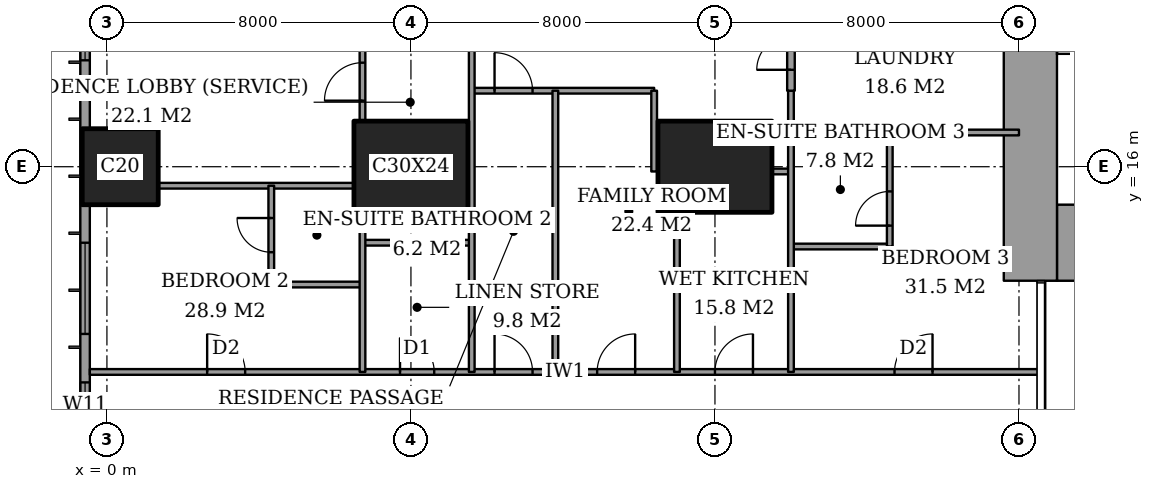
"""IFC4 building model, lengths in metres.
Left out: names, types, materials, properties, quantities, classifications, styles, units other than length and angle.
Written with IfcOpenShell. Run it as: python <this file> out.ifc"""

import sys

from ifc_helpers import new_model, si_unit, direction, frame, frame_2d, origin, origin_2d, place, context, subcontext, project, spatial, rectangle, extrude, element, fill, save


model = new_model("IFC4")
c1 = context("Model", 3, precision=1e-05, world=origin(), true_north=direction((0.0, 1.0)))
c2 = subcontext(c1, "Body", "Model", "MODEL_VIEW")
j1 = project(units=[si_unit("LENGTHUNIT", "METRE"), si_unit("PLANEANGLEUNIT", "RADIAN")], contexts=[c1])
p1 = place(None, origin())
s1 = spatial("IfcSite", under=j1, at=p1, CompositionType="ELEMENT")
p2 = place(p1, origin())
s2 = spatial("IfcBuilding", under=s1, at=p2, CompositionType="ELEMENT")
p3 = place(p2, frame((0.0, 0.0, 168.2)))
s3 = spatial("IfcBuildingStorey", under=s2, at=p3, CompositionType="ELEMENT", Elevation=168.2)
p4 = place(p3, frame((0.35, 16.0, 0.0), z_axis=(0.0, 0.0, 1.0), x_axis=(1.0, 0.0, 0.0)))
e1 = element("IfcColumn", 1, at=p4, inside=s3, PredefinedType="COLUMN", context=c2, shape_type="SweptSolid", body=[
    extrude(rectangle(XDim=2.0, YDim=2.0, at=origin_2d()), origin(), (0.0, 0.0, 1.0), 3.6),
])
for number, where, z_axis, x_axis in (
    (2, (8.0, 16.0, 0.0), (0.0, 0.0, 1.0), (1.0, 0.0, 0.0)),
    (3, (16.0, 16.0, 0.0), (0.0, 0.0, 1.0), (1.0, 0.0, 0.0)),
):
    element("IfcColumn", number, at=place(p3, frame(where, z_axis=z_axis, x_axis=x_axis)), inside=s3, PredefinedType="COLUMN", context=c2, shape_type="SweptSolid", body=[
        extrude(rectangle(XDim=3.0, YDim=2.4, at=origin_2d()), origin(), (0.0, 0.0, 1.0), 3.6),
    ])
p5 = place(p3, frame((25.0, 14.0, 0.0), z_axis=(0.0, 0.0, 1.0), x_axis=(1.0, 0.0, 0.0)))
e4 = element("IfcWall", 4, at=p5, inside=s3, PredefinedType="SHEAR", context=c2, shape_type="SweptSolid", body=[
    extrude(rectangle(XDim=3.15, YDim=2.0, at=frame_2d((1.575, 0.0))), origin(), (0.0, 0.0, 1.0), 3.6),
])
p6 = place(p3, frame((24.3, 13.0, 0.0), z_axis=(0.0, 0.0, 1.0), x_axis=(0.0, 1.0, 0.0)))
e5 = element("IfcWall", 5, at=p6, inside=s3, PredefinedType="SHEAR", context=c2, shape_type="SweptSolid", body=[
    extrude(rectangle(XDim=10.15, YDim=1.4, at=frame_2d((5.075, 0.0))), origin(), (0.0, 0.0, 1.0), 3.6),
])
p7 = place(p3, frame((-0.575, 44.825, 0.0), z_axis=(0.0, 0.0, 1.0), x_axis=(0.0, -1.0, 0.0)))
e6 = element("IfcWall", 6, at=p7, inside=s3, PredefinedType="SOLIDWALL", context=c2, shape_type="SweptSolid", body=[
    extrude(rectangle(XDim=41.65, YDim=0.25, at=frame_2d((20.825, 0.0))), origin(), (0.0, 0.0, 1.0), 3.6),
])
p8 = place(p7, frame((0.775, 0.0, 0.4)))
e7 = element("IfcOpeningElement", 7, at=p8, cuts=e6, PredefinedType="OPENING", context=c2, shape_type="SweptSolid", body=[
    extrude(rectangle(XDim=2.4, YDim=2.2, at=frame_2d((1.2, 1.1))), frame((0.0, 0.135, 0.0), z_axis=(0.0, -1.0, 0.0), x_axis=(1.0, 0.0, 0.0)), (0.0, 0.0, 1.0), 0.27),
])
p9 = place(p7, frame((6.1, 0.0, 0.4)))
e8 = element("IfcOpeningElement", 8, at=p9, cuts=e6, PredefinedType="OPENING", context=c2, shape_type="SweptSolid", body=[
    extrude(rectangle(XDim=1.2, YDim=2.2, at=frame_2d((0.6, 1.1))), frame((0.0, 0.135, 0.0), z_axis=(0.0, -1.0, 0.0), x_axis=(1.0, 0.0, 0.0)), (0.0, 0.0, 1.0), 0.27),
])
p10 = place(p7, frame((8.425, 0.0, 0.4)))
e9 = element("IfcOpeningElement", 9, at=p10, cuts=e6, PredefinedType="OPENING", context=c2, shape_type="SweptSolid", body=[
    extrude(rectangle(XDim=2.4, YDim=2.2, at=frame_2d((1.2, 1.1))), frame((0.0, 0.135, 0.0), z_axis=(0.0, -1.0, 0.0), x_axis=(1.0, 0.0, 0.0)), (0.0, 0.0, 1.0), 0.27),
])
p11 = place(p7, frame((15.625, 0.0, 0.4)))
e10 = element("IfcOpeningElement", 10, at=p11, cuts=e6, PredefinedType="OPENING", context=c2, shape_type="SweptSolid", body=[
    extrude(rectangle(XDim=2.4, YDim=2.2, at=frame_2d((1.2, 1.1))), frame((0.0, 0.135, 0.0), z_axis=(0.0, -1.0, 0.0), x_axis=(1.0, 0.0, 0.0)), (0.0, 0.0, 1.0), 0.27),
])
p12 = place(p7, frame((23.625, 0.0, 0.4)))
e11 = element("IfcOpeningElement", 11, at=p12, cuts=e6, PredefinedType="OPENING", context=c2, shape_type="SweptSolid", body=[
    extrude(rectangle(XDim=2.4, YDim=2.2, at=frame_2d((1.2, 1.1))), frame((0.0, 0.135, 0.0), z_axis=(0.0, -1.0, 0.0), x_axis=(1.0, 0.0, 0.0)), (0.0, 0.0, 1.0), 0.27),
])
p13 = place(p7, frame((30.825, 0.0, 0.4)))
e12 = element("IfcOpeningElement", 12, at=p13, cuts=e6, PredefinedType="OPENING", context=c2, shape_type="SweptSolid", body=[
    extrude(rectangle(XDim=2.4, YDim=2.2, at=frame_2d((1.2, 1.1))), frame((0.0, 0.135, 0.0), z_axis=(0.0, -1.0, 0.0), x_axis=(1.0, 0.0, 0.0)), (0.0, 0.0, 1.0), 0.27),
])
p14 = place(p7, frame((34.5, 0.0, 0.4)))
e13 = element("IfcOpeningElement", 13, at=p14, cuts=e6, PredefinedType="OPENING", context=c2, shape_type="SweptSolid", body=[
    extrude(rectangle(XDim=1.2, YDim=2.2, at=frame_2d((0.6, 1.1))), frame((0.0, 0.135, 0.0), z_axis=(0.0, -1.0, 0.0), x_axis=(1.0, 0.0, 0.0)), (0.0, 0.0, 1.0), 0.27),
])
p15 = place(p7, frame((38.475, 0.0, 0.4)))
e14 = element("IfcOpeningElement", 14, at=p15, cuts=e6, PredefinedType="OPENING", context=c2, shape_type="SweptSolid", body=[
    extrude(rectangle(XDim=2.4, YDim=2.2, at=frame_2d((1.2, 1.1))), frame((0.0, 0.135, 0.0), z_axis=(0.0, -1.0, 0.0), x_axis=(1.0, 0.0, 0.0)), (0.0, 0.0, 1.0), 0.27),
])
p16 = place(p3, frame((-0.45, 10.6, 0.0), z_axis=(0.0, 0.0, 1.0), x_axis=(1.0, 0.0, 0.0)))
e15 = element("IfcWall", 15, at=p16, inside=s3, PredefinedType="PARTITIONING", context=c2, shape_type="SweptSolid", body=[
    extrude(rectangle(XDim=25.011, YDim=0.15, at=frame_2d((12.505, 0.0))), origin(), (0.0, 0.0, 1.0), 3.25),
])
p17 = place(p16, frame((10.65, 0.0, 0.0)))
e16 = element("IfcOpeningElement", 16, at=p17, cuts=e15, PredefinedType="OPENING", context=c2, shape_type="SweptSolid", body=[
    extrude(rectangle(XDim=1.0, YDim=2.1, at=frame_2d((0.5, 1.05))), frame((0.0, 0.085, 0.0), z_axis=(0.0, -1.0, 0.0), x_axis=(1.0, 0.0, 0.0)), (0.0, 0.0, 1.0), 0.17),
])
p18 = place(p16, frame((3.087, 0.0, 0.0)))
e17 = element("IfcOpeningElement", 17, at=p18, cuts=e15, PredefinedType="OPENING", context=c2, shape_type="SweptSolid", body=[
    extrude(rectangle(XDim=1.0, YDim=2.1, at=frame_2d((0.5, 1.05))), frame((0.0, 0.085, 0.0), z_axis=(0.0, -1.0, 0.0), x_axis=(1.0, 0.0, 0.0)), (0.0, 0.0, 1.0), 0.17),
])
p19 = place(p16, frame((8.163, 0.0, 0.0)))
e18 = element("IfcOpeningElement", 18, at=p19, cuts=e15, PredefinedType="OPENING", context=c2, shape_type="SweptSolid", body=[
    extrude(rectangle(XDim=0.9, YDim=2.1, at=frame_2d((0.45, 1.05))), frame((0.0, 0.085, 0.0), z_axis=(0.0, -1.0, 0.0), x_axis=(1.0, 0.0, 0.0)), (0.0, 0.0, 1.0), 0.17),
])
p20 = place(p16, frame((13.35, 0.0, 0.0)))
e19 = element("IfcOpeningElement", 19, at=p20, cuts=e15, PredefinedType="OPENING", context=c2, shape_type="SweptSolid", body=[
    extrude(rectangle(XDim=1.0, YDim=2.1, at=frame_2d((0.5, 1.05))), frame((0.0, 0.085, 0.0), z_axis=(0.0, -1.0, 0.0), x_axis=(1.0, 0.0, 0.0)), (0.0, 0.0, 1.0), 0.17),
])
p21 = place(p16, frame((16.45, 0.0, 0.0)))
e20 = element("IfcOpeningElement", 20, at=p21, cuts=e15, PredefinedType="OPENING", context=c2, shape_type="SweptSolid", body=[
    extrude(rectangle(XDim=1.0, YDim=2.1, at=frame_2d((0.5, 1.05))), frame((0.0, 0.085, 0.0), z_axis=(0.0, -1.0, 0.0), x_axis=(1.0, 0.0, 0.0)), (0.0, 0.0, 1.0), 0.17),
])
p22 = place(p16, frame((21.175, 0.0, 0.0)))
e21 = element("IfcOpeningElement", 21, at=p22, cuts=e15, PredefinedType="OPENING", context=c2, shape_type="SweptSolid", body=[
    extrude(rectangle(XDim=1.0, YDim=2.1, at=frame_2d((0.5, 1.05))), frame((0.0, 0.085, 0.0), z_axis=(0.0, -1.0, 0.0), x_axis=(1.0, 0.0, 0.0)), (0.0, 0.0, 1.0), 0.17),
])
p23 = place(p3, frame((4.325, 12.9, 0.0), z_axis=(0.0, 0.0, 1.0), x_axis=(1.0, 0.0, 0.0)))
e22 = element("IfcWall", 22, at=p23, inside=s3, PredefinedType="PARTITIONING", context=c2, shape_type="SweptSolid", body=[
    extrude(rectangle(XDim=2.4, YDim=0.15, at=frame_2d((1.2, 0.0))), origin(), (0.0, 0.0, 1.0), 3.25),
])
p24 = place(p3, frame((18.0, 13.9, 0.0), z_axis=(0.0, 0.0, 1.0), x_axis=(1.0, 0.0, 0.0)))
e23 = element("IfcWall", 23, at=p24, inside=s3, PredefinedType="PARTITIONING", context=c2, shape_type="SweptSolid", body=[
    extrude(rectangle(XDim=2.6, YDim=0.15, at=frame_2d((1.3, 0.0))), origin(), (0.0, 0.0, 1.0), 3.25),
])
p25 = place(p3, frame((6.725, 14.0, 0.0), z_axis=(0.0, 0.0, 1.0), x_axis=(1.0, 0.0, 0.0)))
e24 = element("IfcWall", 24, at=p25, inside=s3, PredefinedType="PARTITIONING", context=c2, shape_type="SweptSolid", body=[
    extrude(rectangle(XDim=2.875, YDim=0.15, at=frame_2d((1.438, 0.0))), origin(), (0.0, 0.0, 1.0), 3.25),
])
p26 = place(p3, frame((1.35, 15.5, 0.0), z_axis=(0.0, 0.0, 1.0), x_axis=(1.0, 0.0, 0.0)))
e25 = element("IfcWall", 25, at=p26, inside=s3, PredefinedType="PARTITIONING", context=c2, shape_type="SweptSolid", body=[
    extrude(rectangle(XDim=5.15, YDim=0.15, at=frame_2d((2.575, 0.0))), origin(), (0.0, 0.0, 1.0), 3.25),
])
p27 = place(p3, frame((17.5, 15.875, 0.0), z_axis=(0.0, 0.0, 1.0), x_axis=(1.0, 0.0, 0.0)))
e26 = element("IfcWall", 26, at=p27, inside=s3, PredefinedType="PARTITIONING", context=c2, shape_type="SweptSolid", body=[
    extrude(rectangle(XDim=0.5, YDim=0.15, at=frame_2d((0.25, 0.0))), origin(), (0.0, 0.0, 1.0), 3.25),
])
p28 = place(p3, frame((18.0, 16.9, 0.0), z_axis=(0.0, 0.0, 1.0), x_axis=(1.0, 0.0, 0.0)))
e27 = element("IfcWall", 27, at=p28, inside=s3, PredefinedType="PARTITIONING", context=c2, shape_type="SweptSolid", body=[
    extrude(rectangle(XDim=6.0, YDim=0.15, at=frame_2d((3.0, 0.0))), origin(), (0.0, 0.0, 1.0), 3.25),
])
p29 = place(p3, frame((9.6, 18.0, 0.0), z_axis=(0.0, 0.0, 1.0), x_axis=(1.0, 0.0, 0.0)))
e28 = element("IfcWall", 28, at=p29, inside=s3, PredefinedType="PARTITIONING", context=c2, shape_type="SweptSolid", body=[
    extrude(rectangle(XDim=4.8, YDim=0.15, at=frame_2d((2.4, 0.0))), origin(), (0.0, 0.0, 1.0), 3.25),
])
p30 = place(p29, frame((0.6, 0.0, 0.0)))
e29 = element("IfcOpeningElement", 29, at=p30, cuts=e28, PredefinedType="OPENING", context=c2, shape_type="SweptSolid", body=[
    extrude(rectangle(XDim=1.0, YDim=2.1, at=frame_2d((0.5, 1.05))), frame((0.0, 0.085, 0.0), z_axis=(0.0, -1.0, 0.0), x_axis=(1.0, 0.0, 0.0)), (0.0, 0.0, 1.0), 0.17),
])
p31 = place(p3, frame((4.325, 12.9, 0.0), z_axis=(0.0, 0.0, 1.0), x_axis=(0.0, 1.0, 0.0)))
e30 = element("IfcWall", 30, at=p31, inside=s3, PredefinedType="PARTITIONING", context=c2, shape_type="SweptSolid", body=[
    extrude(rectangle(XDim=2.6, YDim=0.15, at=frame_2d((1.3, 0.0))), origin(), (0.0, 0.0, 1.0), 3.25),
])
p32 = place(p31, frame((0.85, 0.0, 0.0)))
e31 = element("IfcOpeningElement", 31, at=p32, cuts=e30, PredefinedType="OPENING", context=c2, shape_type="SweptSolid", body=[
    extrude(rectangle(XDim=0.9, YDim=2.1, at=frame_2d((0.45, 1.05))), frame((0.0, 0.085, 0.0), z_axis=(0.0, -1.0, 0.0), x_axis=(1.0, 0.0, 0.0)), (0.0, 0.0, 1.0), 0.17),
])
p33 = place(p3, frame((6.725, 10.6, 0.0), z_axis=(0.0, 0.0, 1.0), x_axis=(0.0, 1.0, 0.0)))
e32 = element("IfcWall", 32, at=p33, inside=s3, PredefinedType="PARTITIONING", context=c2, shape_type="SweptSolid", body=[
    extrude(rectangle(XDim=4.2, YDim=0.15, at=frame_2d((2.1, 0.0))), origin(), (0.0, 0.0, 1.0), 3.25),
])
p34 = place(p3, frame((6.725, 17.2, 0.0), z_axis=(0.0, 0.0, 1.0), x_axis=(0.0, 1.0, 0.0)))
e33 = element("IfcWall", 33, at=p34, inside=s3, PredefinedType="PARTITIONING", context=c2, shape_type="SweptSolid", body=[
    extrude(rectangle(XDim=2.45, YDim=0.15, at=frame_2d((1.225, 0.0))), origin(), (0.0, 0.0, 1.0), 3.25),
])
p35 = place(p34, frame((0.538, 0.0, 0.0)))
e34 = element("IfcOpeningElement", 34, at=p35, cuts=e33, PredefinedType="OPENING", context=c2, shape_type="SweptSolid", body=[
    extrude(rectangle(XDim=1.0, YDim=2.1, at=frame_2d((0.5, 1.05))), frame((0.0, 0.085, 0.0), z_axis=(0.0, -1.0, 0.0), x_axis=(1.0, 0.0, 0.0)), (0.0, 0.0, 1.0), 0.17),
])
p36 = place(p3, frame((9.6, 10.6, 0.0), z_axis=(0.0, 0.0, 1.0), x_axis=(0.0, 1.0, 0.0)))
e35 = element("IfcWall", 35, at=p36, inside=s3, PredefinedType="PARTITIONING", context=c2, shape_type="SweptSolid", body=[
    extrude(rectangle(XDim=11.0, YDim=0.15, at=frame_2d((5.5, 0.0))), origin(), (0.0, 0.0, 1.0), 3.25),
])
p37 = place(p36, frame((8.7, 0.0, 0.0)))
e36 = element("IfcOpeningElement", 36, at=p37, cuts=e35, PredefinedType="OPENING", context=c2, shape_type="SweptSolid", body=[
    extrude(rectangle(XDim=1.0, YDim=2.1, at=frame_2d((0.5, 1.05))), frame((0.0, 0.085, 0.0), z_axis=(0.0, -1.0, 0.0), x_axis=(1.0, 0.0, 0.0)), (0.0, 0.0, 1.0), 0.17),
])
p38 = place(p3, frame((11.8, 10.6, 0.0), z_axis=(0.0, 0.0, 1.0), x_axis=(0.0, 1.0, 0.0)))
e37 = element("IfcWall", 37, at=p38, inside=s3, PredefinedType="PARTITIONING", context=c2, shape_type="SweptSolid", body=[
    extrude(rectangle(XDim=7.4, YDim=0.15, at=frame_2d((3.7, 0.0))), origin(), (0.0, 0.0, 1.0), 3.25),
])
p39 = place(p3, frame((14.4, 15.875, 0.0), z_axis=(0.0, 0.0, 1.0), x_axis=(0.0, 1.0, 0.0)))
e38 = element("IfcWall", 38, at=p39, inside=s3, PredefinedType="PARTITIONING", context=c2, shape_type="SweptSolid", body=[
    extrude(rectangle(XDim=2.125, YDim=0.15, at=frame_2d((1.062, 0.0))), origin(), (0.0, 0.0, 1.0), 3.25),
])
p40 = place(p3, frame((15.0, 10.6, 0.0), z_axis=(0.0, 0.0, 1.0), x_axis=(0.0, 1.0, 0.0)))
e39 = element("IfcWall", 39, at=p40, inside=s3, PredefinedType="PARTITIONING", context=c2, shape_type="SweptSolid", body=[
    extrude(rectangle(XDim=4.2, YDim=0.15, at=frame_2d((2.1, 0.0))), origin(), (0.0, 0.0, 1.0), 3.25),
])
p41 = place(p3, frame((18.0, 18.0, 0.0), z_axis=(0.0, 0.0, 1.0), x_axis=(0.0, 1.0, 0.0)))
e40 = element("IfcWall", 40, at=p41, inside=s3, PredefinedType="PARTITIONING", context=c2, shape_type="SweptSolid", body=[
    extrude(rectangle(XDim=6.0, YDim=0.2, at=frame_2d((3.0, 0.0))), origin(), (0.0, 0.0, 1.0), 3.25),
])
p42 = place(p41, frame((3.4, 0.0, 0.0)))
e41 = element("IfcOpeningElement", 41, at=p42, cuts=e40, PredefinedType="OPENING", context=c2, shape_type="SweptSolid", body=[
    extrude(rectangle(XDim=1.2, YDim=2.4, at=frame_2d((0.6, 1.2))), frame((0.0, 0.11, 0.0), z_axis=(0.0, -1.0, 0.0), x_axis=(1.0, 0.0, 0.0)), (0.0, 0.0, 1.0), 0.22),
])
p43 = place(p41, frame((0.55, 0.0, 0.0)))
e42 = element("IfcOpeningElement", 42, at=p43, cuts=e40, PredefinedType="OPENING", context=c2, shape_type="SweptSolid", body=[
    extrude(rectangle(XDim=0.9, YDim=2.1, at=frame_2d((0.45, 1.05))), frame((0.0, 0.11, 0.0), z_axis=(0.0, -1.0, 0.0), x_axis=(1.0, 0.0, 0.0)), (0.0, 0.0, 1.0), 0.22),
])
p44 = place(p3, frame((18.0, 10.6, 0.0), z_axis=(0.0, 0.0, 1.0), x_axis=(0.0, 1.0, 0.0)))
e43 = element("IfcWall", 43, at=p44, inside=s3, PredefinedType="PARTITIONING", context=c2, shape_type="SweptSolid", body=[
    extrude(rectangle(XDim=7.4, YDim=0.15, at=frame_2d((3.7, 0.0))), origin(), (0.0, 0.0, 1.0), 3.25),
])
p45 = place(p3, frame((20.6, 13.9, 0.0), z_axis=(0.0, 0.0, 1.0), x_axis=(0.0, 1.0, 0.0)))
e44 = element("IfcWall", 44, at=p45, inside=s3, PredefinedType="PARTITIONING", context=c2, shape_type="SweptSolid", body=[
    extrude(rectangle(XDim=3.0, YDim=0.15, at=frame_2d((1.5, 0.0))), origin(), (0.0, 0.0, 1.0), 3.25),
])
p46 = place(p45, frame((0.55, 0.0, 0.0)))
e45 = element("IfcOpeningElement", 45, at=p46, cuts=e44, PredefinedType="OPENING", context=c2, shape_type="SweptSolid", body=[
    extrude(rectangle(XDim=0.9, YDim=2.1, at=frame_2d((0.45, 1.05))), frame((0.0, 0.085, 0.0), z_axis=(0.0, -1.0, 0.0), x_axis=(1.0, 0.0, 0.0)), (0.0, 0.0, 1.0), 0.17),
])
p47 = place(p12, origin())
e46 = element("IfcWindow", 46, at=p47, inside=s3, PartitioningType="SINGLE_PANEL", PredefinedType="WINDOW", context=c2, shape_type="SweptSolid", body=[
    extrude(rectangle(XDim=2.4, YDim=2.2, at=frame_2d((1.2, 1.1))), frame((0.0, 0.03, 0.0), z_axis=(0.0, -1.0, 0.0), x_axis=(1.0, 0.0, 0.0)), (0.0, 0.0, 1.0), 0.06),
])
fill(e11, e46)
p48 = place(p13, origin())
e47 = element("IfcWindow", 47, at=p48, inside=s3, PartitioningType="SINGLE_PANEL", PredefinedType="WINDOW", context=c2, shape_type="SweptSolid", body=[
    extrude(rectangle(XDim=2.4, YDim=2.2, at=frame_2d((1.2, 1.1))), frame((0.0, 0.03, 0.0), z_axis=(0.0, -1.0, 0.0), x_axis=(1.0, 0.0, 0.0)), (0.0, 0.0, 1.0), 0.06),
])
fill(e12, e47)
p49 = place(p14, origin())
e48 = element("IfcWindow", 48, at=p49, inside=s3, PartitioningType="SINGLE_PANEL", PredefinedType="WINDOW", context=c2, shape_type="SweptSolid", body=[
    extrude(rectangle(XDim=1.2, YDim=2.2, at=frame_2d((0.6, 1.1))), frame((0.0, 0.03, 0.0), z_axis=(0.0, -1.0, 0.0), x_axis=(1.0, 0.0, 0.0)), (0.0, 0.0, 1.0), 0.06),
])
fill(e13, e48)
p50 = place(p17, origin())
e49 = element("IfcDoor", 49, at=p50, inside=s3, OperationType="SINGLE_SWING_RIGHT", PredefinedType="DOOR", context=c2, shape_type="SweptSolid", body=[
    extrude(rectangle(XDim=1.0, YDim=2.1, at=frame_2d((0.5, 1.05))), frame((0.0, 0.025, 0.0), z_axis=(0.0, -1.0, 0.0), x_axis=(1.0, 0.0, 0.0)), (0.0, 0.0, 1.0), 0.05),
])
fill(e16, e49)
p51 = place(p32, origin())
e50 = element("IfcDoor", 50, at=p51, inside=s3, OperationType="SINGLE_SWING_LEFT", PredefinedType="DOOR", context=c2, shape_type="SweptSolid", body=[
    extrude(rectangle(XDim=0.9, YDim=2.1, at=frame_2d((0.45, 1.05))), frame((0.0, 0.025, 0.0), z_axis=(0.0, -1.0, 0.0), x_axis=(1.0, 0.0, 0.0)), (0.0, 0.0, 1.0), 0.05),
])
fill(e31, e50)
p52 = place(p18, origin())
e51 = element("IfcDoor", 51, at=p52, inside=s3, OperationType="SINGLE_SWING_RIGHT", PredefinedType="DOOR", context=c2, shape_type="SweptSolid", body=[
    extrude(rectangle(XDim=1.0, YDim=2.1, at=frame_2d((0.5, 1.05))), frame((0.0, 0.025, 0.0), z_axis=(0.0, -1.0, 0.0), x_axis=(1.0, 0.0, 0.0)), (0.0, 0.0, 1.0), 0.05),
])
fill(e17, e51)
p53 = place(p35, origin())
e52 = element("IfcDoor", 52, at=p53, inside=s3, OperationType="SINGLE_SWING_RIGHT", PredefinedType="DOOR", context=c2, shape_type="SweptSolid", body=[
    extrude(rectangle(XDim=1.0, YDim=2.1, at=frame_2d((0.5, 1.05))), frame((0.0, 0.025, 0.0), z_axis=(0.0, -1.0, 0.0), x_axis=(1.0, 0.0, 0.0)), (0.0, 0.0, 1.0), 0.05),
])
fill(e34, e52)
p54 = place(p19, origin())
e53 = element("IfcDoor", 53, at=p54, inside=s3, OperationType="SINGLE_SWING_RIGHT", PredefinedType="DOOR", context=c2, shape_type="SweptSolid", body=[
    extrude(rectangle(XDim=0.9, YDim=2.1, at=frame_2d((0.45, 1.05))), frame((0.0, 0.025, 0.0), z_axis=(0.0, -1.0, 0.0), x_axis=(1.0, 0.0, 0.0)), (0.0, 0.0, 1.0), 0.05),
])
fill(e18, e53)
p55 = place(p30, origin())
e54 = element("IfcDoor", 54, at=p55, inside=s3, OperationType="SINGLE_SWING_RIGHT", PredefinedType="DOOR", context=c2, shape_type="SweptSolid", body=[
    extrude(rectangle(XDim=1.0, YDim=2.1, at=frame_2d((0.5, 1.05))), frame((0.0, 0.025, 0.0), z_axis=(0.0, -1.0, 0.0), x_axis=(1.0, 0.0, 0.0)), (0.0, 0.0, 1.0), 0.05),
])
fill(e29, e54)
p56 = place(p20, origin())
e55 = element("IfcDoor", 55, at=p56, inside=s3, OperationType="SINGLE_SWING_LEFT", PredefinedType="DOOR", context=c2, shape_type="SweptSolid", body=[
    extrude(rectangle(XDim=1.0, YDim=2.1, at=frame_2d((0.5, 1.05))), frame((0.0, 0.025, 0.0), z_axis=(0.0, -1.0, 0.0), x_axis=(1.0, 0.0, 0.0)), (0.0, 0.0, 1.0), 0.05),
])
fill(e19, e55)
p57 = place(p21, origin())
e56 = element("IfcDoor", 56, at=p57, inside=s3, OperationType="SINGLE_SWING_LEFT", PredefinedType="DOOR", context=c2, shape_type="SweptSolid", body=[
    extrude(rectangle(XDim=1.0, YDim=2.1, at=frame_2d((0.5, 1.05))), frame((0.0, 0.025, 0.0), z_axis=(0.0, -1.0, 0.0), x_axis=(1.0, 0.0, 0.0)), (0.0, 0.0, 1.0), 0.05),
])
fill(e20, e56)
p58 = place(p46, origin())
e57 = element("IfcDoor", 57, at=p58, inside=s3, OperationType="SINGLE_SWING_RIGHT", PredefinedType="DOOR", context=c2, shape_type="SweptSolid", body=[
    extrude(rectangle(XDim=0.9, YDim=2.1, at=frame_2d((0.45, 1.05))), frame((0.0, 0.025, 0.0), z_axis=(0.0, -1.0, 0.0), x_axis=(1.0, 0.0, 0.0)), (0.0, 0.0, 1.0), 0.05),
])
fill(e45, e57)
p59 = place(p22, origin())
e58 = element("IfcDoor", 58, at=p59, inside=s3, OperationType="SINGLE_SWING_LEFT", PredefinedType="DOOR", context=c2, shape_type="SweptSolid", body=[
    extrude(rectangle(XDim=1.0, YDim=2.1, at=frame_2d((0.5, 1.05))), frame((0.0, 0.025, 0.0), z_axis=(0.0, -1.0, 0.0), x_axis=(1.0, 0.0, 0.0)), (0.0, 0.0, 1.0), 0.05),
])
fill(e21, e58)
p60 = place(p43, origin())
e59 = element("IfcDoor", 59, at=p60, inside=s3, OperationType="SINGLE_SWING_RIGHT", PredefinedType="DOOR", context=c2, shape_type="SweptSolid", body=[
    extrude(rectangle(XDim=0.9, YDim=2.1, at=frame_2d((0.45, 1.05))), frame((0.0, 0.025, 0.0), z_axis=(0.0, -1.0, 0.0), x_axis=(1.0, 0.0, 0.0)), (0.0, 0.0, 1.0), 0.05),
])
fill(e42, e59)
save(model, sys.argv[1])
